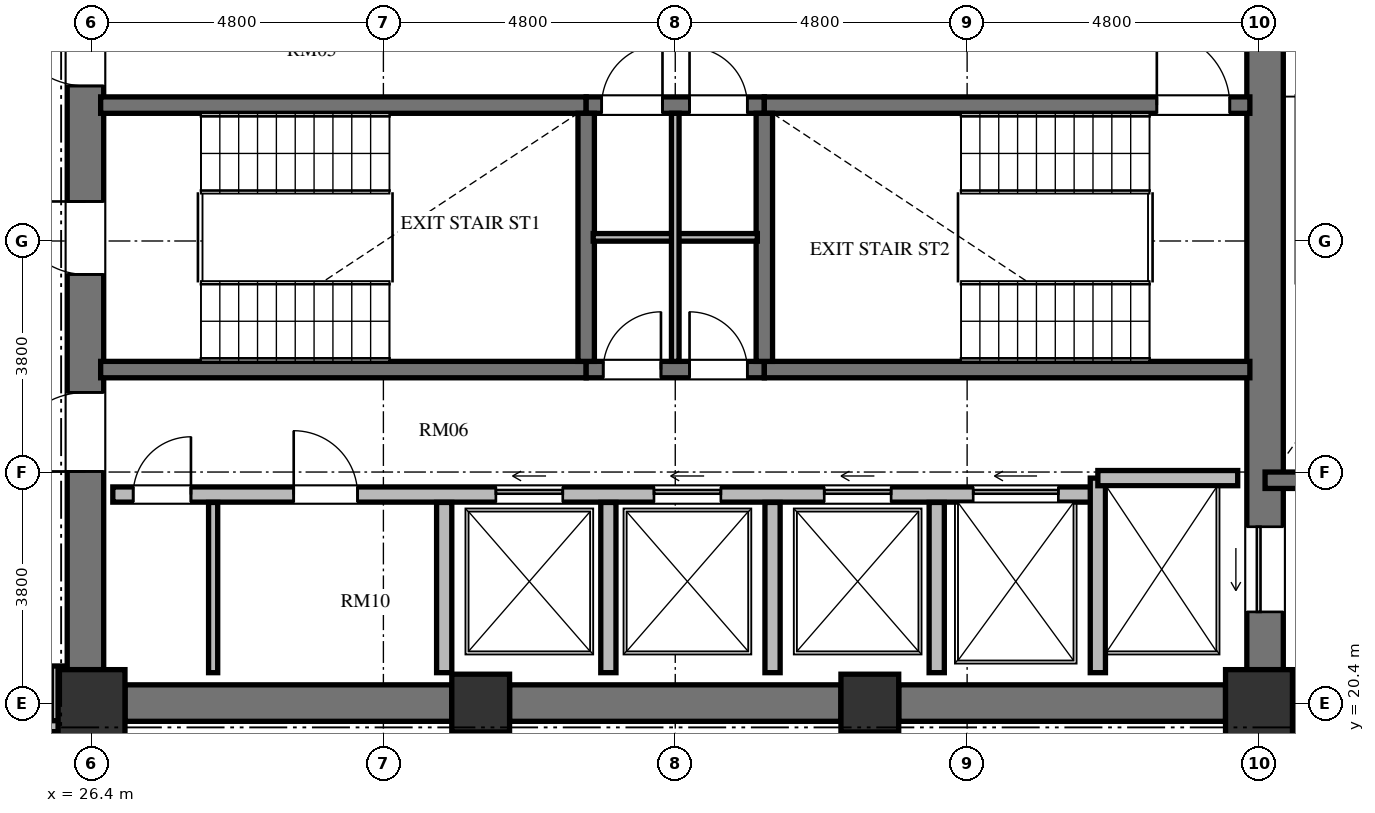
"""IFC4 building model, lengths in metres.
Left out: names, types, materials, properties, quantities, classifications, styles, units other than length and angle.
Written with IfcOpenShell. Run it as: python <this file> out.ifc"""

import sys

from ifc_helpers import new_model, si_unit, direction, frame, frame_2d, origin, origin_2d, place, context, subcontext, project, spatial, rectangle, extrude, element, fill, save


model = new_model("IFC4")
c1 = context("Model", 3, precision=1e-05, world=origin(), true_north=direction((0.0, 1.0)))
c2 = subcontext(c1, "Body", "Model", "MODEL_VIEW")
j1 = project(units=[si_unit("LENGTHUNIT", "METRE"), si_unit("PLANEANGLEUNIT", "RADIAN")], contexts=[c1])
p1 = place(None, origin())
s1 = spatial("IfcSite", under=j1, at=p1, CompositionType="ELEMENT")
p2 = place(p1, origin())
s2 = spatial("IfcBuilding", under=s1, at=p2, CompositionType="ELEMENT")
p3 = place(p2, frame((0.0, 0.0, 141.936)))
s3 = spatial("IfcBuildingStorey", under=s2, at=p3, CompositionType="ELEMENT", Elevation=141.936)
p4 = place(p3, frame((26.4, 20.4, 0.0), z_axis=(0.0, 0.0, 1.0), x_axis=(1.0, 0.0, 0.0)))
e1 = element("IfcColumn", 1, at=p4, inside=s3, PredefinedType="COLUMN", context=c2, shape_type="SweptSolid", body=[
    extrude(rectangle(XDim=1.1, YDim=1.1, at=origin_2d()), origin(), (0.0, 0.0, 1.0), 3.648),
])
for number, where, z_axis, x_axis in (
    (2, (32.8, 20.4, 0.0), (0.0, 0.0, 1.0), (1.0, 0.0, 0.0)),
    (3, (39.2, 20.4, 0.0), (0.0, 0.0, 1.0), (1.0, 0.0, 0.0)),
):
    element("IfcColumn", number, at=place(p3, frame(where, z_axis=z_axis, x_axis=x_axis)), inside=s3, PredefinedType="COLUMN", context=c2, shape_type="SweptSolid", body=[
        extrude(rectangle(XDim=0.95, YDim=0.95, at=origin_2d()), origin(), (0.0, 0.0, 1.0), 3.648),
    ])
p5 = place(p3, frame((45.6, 20.4, 0.0), z_axis=(0.0, 0.0, 1.0), x_axis=(1.0, 0.0, 0.0)))
e4 = element("IfcColumn", 4, at=p5, inside=s3, PredefinedType="COLUMN", context=c2, shape_type="SweptSolid", body=[
    extrude(rectangle(XDim=1.1, YDim=1.1, at=origin_2d()), origin(), (0.0, 0.0, 1.0), 3.648),
])
p6 = place(p3, frame((26.3, 20.95, 0.0), z_axis=(0.0, 0.0, 1.0), x_axis=(0.0, 1.0, 0.0)))
e5 = element("IfcWall", 5, at=p6, inside=s3, PredefinedType="SHEAR", context=c2, shape_type="SweptSolid", body=[
    extrude(rectangle(XDim=14.1, YDim=0.6, at=frame_2d((7.05, 0.0))), origin(), (0.0, 0.0, 1.0), 3.648),
])
p7 = place(p6, frame((6.5, 0.0, 0.0)))
e6 = element("IfcOpeningElement", 6, at=p7, cuts=e5, PredefinedType="OPENING", context=c2, shape_type="SweptSolid", body=[
    extrude(rectangle(XDim=1.2, YDim=2.15, at=frame_2d((0.6, 1.075))), frame((0.0, 0.31, 0.0), z_axis=(0.0, -1.0, 0.0), x_axis=(1.0, 0.0, 0.0)), (0.0, 0.0, 1.0), 0.62),
])
p8 = place(p6, frame((9.6, 0.0, 0.0)))
e7 = element("IfcOpeningElement", 7, at=p8, cuts=e5, PredefinedType="OPENING", context=c2, shape_type="SweptSolid", body=[
    extrude(rectangle(XDim=1.3, YDim=2.2, at=frame_2d((0.65, 1.1))), frame((0.0, 0.31, 0.0), z_axis=(0.0, -1.0, 0.0), x_axis=(1.0, 0.0, 0.0)), (0.0, 0.0, 1.0), 0.62),
])
p9 = place(p6, frame((3.26, 0.0, 0.0)))
e8 = element("IfcOpeningElement", 8, at=p9, cuts=e5, PredefinedType="OPENING", context=c2, shape_type="SweptSolid", body=[
    extrude(rectangle(XDim=1.3, YDim=2.2, at=frame_2d((0.65, 1.1))), frame((0.0, 0.31, 0.0), z_axis=(0.0, -1.0, 0.0), x_axis=(1.0, 0.0, 0.0)), (0.0, 0.0, 1.0), 0.62),
])
p10 = place(p3, frame((45.7, 20.95, 0.0), z_axis=(0.0, 0.0, 1.0), x_axis=(0.0, 1.0, 0.0)))
e9 = element("IfcWall", 9, at=p10, inside=s3, PredefinedType="SHEAR", context=c2, shape_type="SweptSolid", body=[
    extrude(rectangle(XDim=14.1, YDim=0.6, at=frame_2d((7.05, 0.0))), origin(), (0.0, 0.0, 1.0), 3.648),
])
p11 = place(p10, frame((11.75, 0.0, 0.0)))
e10 = element("IfcOpeningElement", 10, at=p11, cuts=e9, PredefinedType="OPENING", context=c2, shape_type="SweptSolid", body=[
    extrude(rectangle(XDim=1.4, YDim=2.3, at=frame_2d((0.7, 1.15))), frame((0.0, 0.31, 0.0), z_axis=(0.0, -1.0, 0.0), x_axis=(1.0, 0.0, 0.0)), (0.0, 0.0, 1.0), 0.62),
])
p12 = place(p10, frame((0.95, 0.0, 0.0)))
e11 = element("IfcOpeningElement", 11, at=p12, cuts=e9, PredefinedType="OPENING", context=c2, shape_type="SweptSolid", body=[
    extrude(rectangle(XDim=1.4, YDim=2.3, at=frame_2d((0.7, 1.15))), frame((0.0, 0.31, 0.0), z_axis=(0.0, -1.0, 0.0), x_axis=(1.0, 0.0, 0.0)), (0.0, 0.0, 1.0), 0.62),
])
p13 = place(p3, frame((26.95, 20.4, 0.0), z_axis=(0.0, 0.0, 1.0), x_axis=(1.0, 0.0, 0.0)))
e12 = element("IfcWall", 12, at=p13, inside=s3, PredefinedType="SHEAR", context=c2, shape_type="SweptSolid", body=[
    extrude(rectangle(XDim=5.375, YDim=0.6, at=frame_2d((2.688, 0.0))), origin(), (0.0, 0.0, 1.0), 3.648),
])
p14 = place(p3, frame((33.275, 20.4, 0.0), z_axis=(0.0, 0.0, 1.0), x_axis=(1.0, 0.0, 0.0)))
e13 = element("IfcWall", 13, at=p14, inside=s3, PredefinedType="SHEAR", context=c2, shape_type="SweptSolid", body=[
    extrude(rectangle(XDim=5.45, YDim=0.6, at=frame_2d((2.725, 0.0))), origin(), (0.0, 0.0, 1.0), 3.648),
])
p15 = place(p3, frame((39.675, 20.4, 0.0), z_axis=(0.0, 0.0, 1.0), x_axis=(1.0, 0.0, 0.0)))
e14 = element("IfcWall", 14, at=p15, inside=s3, PredefinedType="SHEAR", context=c2, shape_type="SweptSolid", body=[
    extrude(rectangle(XDim=5.375, YDim=0.6, at=frame_2d((2.688, 0.0))), origin(), (0.0, 0.0, 1.0), 3.648),
])
p16 = place(p3, frame((26.55, 30.235, 0.0), z_axis=(0.0, 0.0, 1.0), x_axis=(1.0, 0.0, 0.0)))
e15 = element("IfcWall", 15, at=p16, inside=s3, PredefinedType="SHEAR", context=c2, shape_type="SweptSolid", body=[
    extrude(rectangle(XDim=7.985, YDim=0.27, at=frame_2d((3.992, 0.0))), origin(), (0.0, 0.0, 1.0), 3.648),
])
p17 = place(p3, frame((34.535, 30.235, 0.0), z_axis=(0.0, 0.0, 1.0), x_axis=(1.0, 0.0, 0.0)))
e16 = element("IfcWall", 16, at=p17, inside=s3, PredefinedType="SHEAR", context=c2, shape_type="SweptSolid", body=[
    extrude(rectangle(XDim=2.93, YDim=0.27, at=frame_2d((1.465, 0.0))), origin(), (0.0, 0.0, 1.0), 3.648),
])
p18 = place(p17, frame((0.255, 0.0, 0.0)))
e17 = element("IfcOpeningElement", 17, at=p18, cuts=e16, PredefinedType="OPENING", context=c2, shape_type="SweptSolid", body=[
    extrude(rectangle(XDim=1.0, YDim=2.1, at=frame_2d((0.5, 1.05))), frame((0.0, 0.145, 0.0), z_axis=(0.0, -1.0, 0.0), x_axis=(1.0, 0.0, 0.0)), (0.0, 0.0, 1.0), 0.29),
])
p19 = place(p17, frame((1.7, 0.0, 0.0)))
e18 = element("IfcOpeningElement", 18, at=p19, cuts=e16, PredefinedType="OPENING", context=c2, shape_type="SweptSolid", body=[
    extrude(rectangle(XDim=0.95, YDim=2.1, at=frame_2d((0.475, 1.05))), frame((0.0, 0.145, 0.0), z_axis=(0.0, -1.0, 0.0), x_axis=(1.0, 0.0, 0.0)), (0.0, 0.0, 1.0), 0.29),
])
p20 = place(p3, frame((37.465, 30.235, 0.0), z_axis=(0.0, 0.0, 1.0), x_axis=(1.0, 0.0, 0.0)))
e19 = element("IfcWall", 19, at=p20, inside=s3, PredefinedType="SHEAR", context=c2, shape_type="SweptSolid", body=[
    extrude(rectangle(XDim=7.985, YDim=0.27, at=frame_2d((3.992, 0.0))), origin(), (0.0, 0.0, 1.0), 3.648),
])
p21 = place(p20, frame((6.455, 0.0, 0.0)))
e20 = element("IfcOpeningElement", 20, at=p21, cuts=e19, PredefinedType="OPENING", context=c2, shape_type="SweptSolid", body=[
    extrude(rectangle(XDim=1.2, YDim=2.15, at=frame_2d((0.6, 1.075))), frame((0.0, 0.145, 0.0), z_axis=(0.0, -1.0, 0.0), x_axis=(1.0, 0.0, 0.0)), (0.0, 0.0, 1.0), 0.29),
])
p22 = place(p3, frame((26.55, 25.885, 0.0), z_axis=(0.0, 0.0, 1.0), x_axis=(1.0, 0.0, 0.0)))
e21 = element("IfcWall", 21, at=p22, inside=s3, PredefinedType="SHEAR", context=c2, shape_type="SweptSolid", body=[
    extrude(rectangle(XDim=7.985, YDim=0.27, at=frame_2d((3.992, 0.0))), origin(), (0.0, 0.0, 1.0), 3.648),
])
p23 = place(p3, frame((34.535, 25.885, 0.0), z_axis=(0.0, 0.0, 1.0), x_axis=(1.0, 0.0, 0.0)))
e22 = element("IfcWall", 22, at=p23, inside=s3, PredefinedType="SHEAR", context=c2, shape_type="SweptSolid", body=[
    extrude(rectangle(XDim=2.93, YDim=0.27, at=frame_2d((1.465, 0.0))), origin(), (0.0, 0.0, 1.0), 3.648),
])
p24 = place(p23, frame((0.28, 0.0, 0.0)))
e23 = element("IfcOpeningElement", 23, at=p24, cuts=e22, PredefinedType="OPENING", context=c2, shape_type="SweptSolid", body=[
    extrude(rectangle(XDim=0.95, YDim=2.1, at=frame_2d((0.475, 1.05))), frame((0.0, 0.145, 0.0), z_axis=(0.0, -1.0, 0.0), x_axis=(1.0, 0.0, 0.0)), (0.0, 0.0, 1.0), 0.29),
])
p25 = place(p23, frame((1.7, 0.0, 0.0)))
e24 = element("IfcOpeningElement", 24, at=p25, cuts=e22, PredefinedType="OPENING", context=c2, shape_type="SweptSolid", body=[
    extrude(rectangle(XDim=0.95, YDim=2.1, at=frame_2d((0.475, 1.05))), frame((0.0, 0.145, 0.0), z_axis=(0.0, -1.0, 0.0), x_axis=(1.0, 0.0, 0.0)), (0.0, 0.0, 1.0), 0.29),
])
p26 = place(p3, frame((37.465, 25.885, 0.0), z_axis=(0.0, 0.0, 1.0), x_axis=(1.0, 0.0, 0.0)))
e25 = element("IfcWall", 25, at=p26, inside=s3, PredefinedType="SHEAR", context=c2, shape_type="SweptSolid", body=[
    extrude(rectangle(XDim=7.985, YDim=0.27, at=frame_2d((3.992, 0.0))), origin(), (0.0, 0.0, 1.0), 3.648),
])
for number, where, z_axis, x_axis in (
    (26, (34.535, 26.02, 0.0), (0.0, 0.0, 1.0), (0.0, 1.0, 0.0)),
    (27, (37.465, 26.02, 0.0), (0.0, 0.0, 1.0), (0.0, 1.0, 0.0)),
):
    element("IfcWall", number, at=place(p3, frame(where, z_axis=z_axis, x_axis=x_axis)), inside=s3, PredefinedType="SHEAR", context=c2, shape_type="SweptSolid", body=[
        extrude(rectangle(XDim=4.08, YDim=0.27, at=frame_2d((2.04, 0.0))), origin(), (0.0, 0.0, 1.0), 3.648),
    ])
p27 = place(p3, frame((34.65, 28.06, 0.0), z_axis=(0.0, 0.0, 1.0), x_axis=(1.0, 0.0, 0.0)))
e28 = element("IfcWall", 28, at=p27, inside=s3, PredefinedType="PARTITIONING", context=c2, shape_type="SweptSolid", body=[
    extrude(rectangle(XDim=2.7, YDim=0.125, at=frame_2d((1.35, 0.0))), origin(), (0.0, 0.0, 1.0), 3.428),
])
p28 = place(p3, frame((36.0, 26.02, 0.0), z_axis=(0.0, 0.0, 1.0), x_axis=(0.0, 1.0, 0.0)))
e29 = element("IfcWall", 29, at=p28, inside=s3, PredefinedType="PARTITIONING", context=c2, shape_type="SweptSolid", body=[
    extrude(rectangle(XDim=4.08, YDim=0.125, at=frame_2d((2.04, 0.0))), origin(), (0.0, 0.0, 1.0), 3.428),
])
p29 = place(p3, frame((26.75, 23.83, 0.0), z_axis=(0.0, 0.0, 1.0), x_axis=(1.0, 0.0, 0.0)))
e30 = element("IfcWall", 30, at=p29, inside=s3, PredefinedType="SOLIDWALL", context=c2, shape_type="SweptSolid", body=[
    extrude(rectangle(XDim=16.2, YDim=0.25, at=frame_2d((8.1, 0.0))), origin(), (0.0, 0.0, 1.0), 3.428),
])
p30 = place(p29, frame((0.335, 0.0, 0.0)))
e31 = element("IfcOpeningElement", 31, at=p30, cuts=e30, PredefinedType="OPENING", context=c2, shape_type="SweptSolid", body=[
    extrude(rectangle(XDim=0.95, YDim=2.1, at=frame_2d((0.475, 1.05))), frame((0.0, 0.135, 0.0), z_axis=(0.0, -1.0, 0.0), x_axis=(1.0, 0.0, 0.0)), (0.0, 0.0, 1.0), 0.27),
])
p31 = place(p29, frame((2.975, 0.0, 0.0)))
e32 = element("IfcOpeningElement", 32, at=p31, cuts=e30, PredefinedType="OPENING", context=c2, shape_type="SweptSolid", body=[
    extrude(rectangle(XDim=1.05, YDim=2.15, at=frame_2d((0.525, 1.075))), frame((0.0, 0.135, 0.0), z_axis=(0.0, -1.0, 0.0), x_axis=(1.0, 0.0, 0.0)), (0.0, 0.0, 1.0), 0.27),
])
p32 = place(p29, frame((6.3, 0.0, 0.0)))
e33 = element("IfcOpeningElement", 33, at=p32, cuts=e30, PredefinedType="OPENING", context=c2, shape_type="SweptSolid", body=[
    extrude(rectangle(XDim=1.1, YDim=2.2, at=frame_2d((0.55, 1.1))), frame((0.0, 0.135, 0.0), z_axis=(0.0, -1.0, 0.0), x_axis=(1.0, 0.0, 0.0)), (0.0, 0.0, 1.0), 0.27),
])
p33 = place(p29, frame((8.9, 0.0, 0.0)))
e34 = element("IfcOpeningElement", 34, at=p33, cuts=e30, PredefinedType="OPENING", context=c2, shape_type="SweptSolid", body=[
    extrude(rectangle(XDim=1.1, YDim=2.2, at=frame_2d((0.55, 1.1))), frame((0.0, 0.135, 0.0), z_axis=(0.0, -1.0, 0.0), x_axis=(1.0, 0.0, 0.0)), (0.0, 0.0, 1.0), 0.27),
])
p34 = place(p29, frame((11.7, 0.0, 0.0)))
e35 = element("IfcOpeningElement", 35, at=p34, cuts=e30, PredefinedType="OPENING", context=c2, shape_type="SweptSolid", body=[
    extrude(rectangle(XDim=1.1, YDim=2.2, at=frame_2d((0.55, 1.1))), frame((0.0, 0.135, 0.0), z_axis=(0.0, -1.0, 0.0), x_axis=(1.0, 0.0, 0.0)), (0.0, 0.0, 1.0), 0.27),
])
p35 = place(p29, frame((14.15, 0.0, 0.0)))
e36 = element("IfcOpeningElement", 36, at=p35, cuts=e30, PredefinedType="OPENING", context=c2, shape_type="SweptSolid", body=[
    extrude(rectangle(XDim=1.4, YDim=2.3, at=frame_2d((0.7, 1.15))), frame((0.0, 0.135, 0.0), z_axis=(0.0, -1.0, 0.0), x_axis=(1.0, 0.0, 0.0)), (0.0, 0.0, 1.0), 0.27),
])
p36 = place(p3, frame((42.95, 20.9, 0.0), z_axis=(0.0, 0.0, 1.0), x_axis=(0.0, 1.0, 0.0)))
e37 = element("IfcWall", 37, at=p36, inside=s3, PredefinedType="SOLIDWALL", context=c2, shape_type="SweptSolid", body=[
    extrude(rectangle(XDim=3.2, YDim=0.25, at=frame_2d((1.6, 0.0))), origin(), (0.0, 0.0, 1.0), 3.428),
])
p37 = place(p3, frame((42.95, 24.1, 0.0), z_axis=(0.0, 0.0, 1.0), x_axis=(1.0, 0.0, 0.0)))
e38 = element("IfcWall", 38, at=p37, inside=s3, PredefinedType="SOLIDWALL", context=c2, shape_type="SweptSolid", body=[
    extrude(rectangle(XDim=2.3, YDim=0.25, at=frame_2d((1.15, 0.0))), origin(), (0.0, 0.0, 1.0), 3.428),
])
for number, where, z_axis, x_axis in (
    (39, (32.2, 20.9, 0.0), (0.0, 0.0, 1.0), (0.0, 1.0, 0.0)),
    (40, (34.9, 20.9, 0.0), (0.0, 0.0, 1.0), (0.0, 1.0, 0.0)),
    (41, (37.6, 20.9, 0.0), (0.0, 0.0, 1.0), (0.0, 1.0, 0.0)),
    (42, (40.3, 20.9, 0.0), (0.0, 0.0, 1.0), (0.0, 1.0, 0.0)),
):
    element("IfcWall", number, at=place(p3, frame(where, z_axis=z_axis, x_axis=x_axis)), inside=s3, PredefinedType="SOLIDWALL", context=c2, shape_type="SweptSolid", body=[
        extrude(rectangle(XDim=2.8, YDim=0.25, at=frame_2d((1.4, 0.0))), origin(), (0.0, 0.0, 1.0), 3.428),
    ])
p38 = place(p3, frame((28.4, 20.9, 0.0), z_axis=(0.0, 0.0, 1.0), x_axis=(0.0, 1.0, 0.0)))
e43 = element("IfcWall", 43, at=p38, inside=s3, PredefinedType="PARTITIONING", context=c2, shape_type="SweptSolid", body=[
    extrude(rectangle(XDim=2.8, YDim=0.15, at=frame_2d((1.4, 0.0))), origin(), (0.0, 0.0, 1.0), 3.428),
])
p39 = place(p3, frame((45.7, 24.065, 0.0), z_axis=(0.0, 0.0, 1.0), x_axis=(1.0, 0.0, 0.0)))
e44 = element("IfcWall", 44, at=p39, inside=s3, PredefinedType="SHEAR", context=c2, shape_type="SweptSolid", body=[
    extrude(rectangle(XDim=4.715, YDim=0.27, at=frame_2d((2.357, 0.0))), origin(), (0.0, 0.0, 1.0), 3.648),
])
p40 = place(p3, frame((45.7, 20.02, 0.0), z_axis=(0.0, 0.0, 1.0), x_axis=(1.0, 0.0, 0.0)))
e45 = element("IfcWall", 45, at=p40, inside=s3, PredefinedType="SOLIDWALL", context=c2, shape_type="SweptSolid", body=[
    extrude(rectangle(XDim=4.715, YDim=0.25, at=frame_2d((2.357, 0.0))), origin(), (0.0, 0.0, 1.0), 3.428),
])
p41 = place(p3, frame((25.83, 21.01, 0.0), z_axis=(0.0, 0.0, 1.0), x_axis=(0.0, -1.0, 0.0)))
e46 = element("IfcWall", 46, at=p41, inside=s3, PredefinedType="PARTITIONING", context=c2, shape_type="SweptSolid", body=[
    extrude(rectangle(XDim=1.03, YDim=0.18, at=frame_2d((0.515, 0.0))), origin(), (0.0, 0.0, 1.0), 3.428),
])
p42 = place(p3, frame((25.87, 20.02, 0.0), z_axis=(0.0, 0.0, 1.0), x_axis=(-1.0, 0.0, 0.0)))
e47 = element("IfcWall", 47, at=p42, inside=s3, PredefinedType="PARTITIONING", context=c2, shape_type="SweptSolid", body=[
    extrude(rectangle(XDim=2.56, YDim=0.18, at=frame_2d((1.28, 0.0))), origin(), (0.0, 0.0, 1.0), 3.428),
])
p43 = place(p7, origin())
e48 = element("IfcDoor", 48, at=p43, inside=s3, OperationType="SINGLE_SWING_RIGHT", PredefinedType="DOOR", context=c2, shape_type="SweptSolid", body=[
    extrude(rectangle(XDim=1.2, YDim=2.15, at=frame_2d((0.6, 1.075))), frame((0.0, 0.025, 0.0), z_axis=(0.0, -1.0, 0.0), x_axis=(1.0, 0.0, 0.0)), (0.0, 0.0, 1.0), 0.05),
])
fill(e6, e48)
p44 = place(p21, origin())
e49 = element("IfcDoor", 49, at=p44, inside=s3, OperationType="SINGLE_SWING_LEFT", PredefinedType="DOOR", context=c2, shape_type="SweptSolid", body=[
    extrude(rectangle(XDim=1.2, YDim=2.15, at=frame_2d((0.6, 1.075))), frame((0.0, 0.025, 0.0), z_axis=(0.0, -1.0, 0.0), x_axis=(1.0, 0.0, 0.0)), (0.0, 0.0, 1.0), 0.05),
])
fill(e20, e49)
p45 = place(p24, origin())
e50 = element("IfcDoor", 50, at=p45, inside=s3, OperationType="SINGLE_SWING_RIGHT", PredefinedType="DOOR", context=c2, shape_type="SweptSolid", body=[
    extrude(rectangle(XDim=0.95, YDim=2.1, at=frame_2d((0.475, 1.05))), frame((0.0, 0.025, 0.0), z_axis=(0.0, -1.0, 0.0), x_axis=(1.0, 0.0, 0.0)), (0.0, 0.0, 1.0), 0.05),
])
fill(e23, e50)
p46 = place(p25, origin())
e51 = element("IfcDoor", 51, at=p46, inside=s3, OperationType="SINGLE_SWING_LEFT", PredefinedType="DOOR", context=c2, shape_type="SweptSolid", body=[
    extrude(rectangle(XDim=0.95, YDim=2.1, at=frame_2d((0.475, 1.05))), frame((0.0, 0.025, 0.0), z_axis=(0.0, -1.0, 0.0), x_axis=(1.0, 0.0, 0.0)), (0.0, 0.0, 1.0), 0.05),
])
fill(e24, e51)
p47 = place(p18, origin())
e52 = element("IfcDoor", 52, at=p47, inside=s3, OperationType="SINGLE_SWING_RIGHT", PredefinedType="DOOR", context=c2, shape_type="SweptSolid", body=[
    extrude(rectangle(XDim=1.0, YDim=2.1, at=frame_2d((0.5, 1.05))), frame((0.0, 0.025, 0.0), z_axis=(0.0, -1.0, 0.0), x_axis=(1.0, 0.0, 0.0)), (0.0, 0.0, 1.0), 0.05),
])
fill(e17, e52)
p48 = place(p19, origin())
e53 = element("IfcDoor", 53, at=p48, inside=s3, OperationType="SINGLE_SWING_LEFT", PredefinedType="DOOR", context=c2, shape_type="SweptSolid", body=[
    extrude(rectangle(XDim=0.95, YDim=2.1, at=frame_2d((0.475, 1.05))), frame((0.0, 0.025, 0.0), z_axis=(0.0, -1.0, 0.0), x_axis=(1.0, 0.0, 0.0)), (0.0, 0.0, 1.0), 0.05),
])
fill(e18, e53)
p49 = place(p8, origin())
e54 = element("IfcDoor", 54, at=p49, inside=s3, OperationType="SINGLE_SWING_RIGHT", PredefinedType="DOOR", context=c2, shape_type="SweptSolid", body=[
    extrude(rectangle(XDim=1.3, YDim=2.2, at=frame_2d((0.65, 1.1))), frame((0.0, 0.025, 0.0), z_axis=(0.0, -1.0, 0.0), x_axis=(1.0, 0.0, 0.0)), (0.0, 0.0, 1.0), 0.05),
])
fill(e7, e54)
p50 = place(p9, origin())
e55 = element("IfcDoor", 55, at=p50, inside=s3, OperationType="SINGLE_SWING_LEFT", PredefinedType="DOOR", context=c2, shape_type="SweptSolid", body=[
    extrude(rectangle(XDim=1.3, YDim=2.2, at=frame_2d((0.65, 1.1))), frame((0.0, 0.025, 0.0), z_axis=(0.0, -1.0, 0.0), x_axis=(1.0, 0.0, 0.0)), (0.0, 0.0, 1.0), 0.05),
])
fill(e8, e55)
p51 = place(p30, origin())
e56 = element("IfcDoor", 56, at=p51, inside=s3, OperationType="SINGLE_SWING_RIGHT", PredefinedType="DOOR", context=c2, shape_type="SweptSolid", body=[
    extrude(rectangle(XDim=0.95, YDim=2.1, at=frame_2d((0.475, 1.05))), frame((0.0, 0.025, 0.0), z_axis=(0.0, -1.0, 0.0), x_axis=(1.0, 0.0, 0.0)), (0.0, 0.0, 1.0), 0.05),
])
fill(e31, e56)
p52 = place(p31, origin())
e57 = element("IfcDoor", 57, at=p52, inside=s3, OperationType="SINGLE_SWING_LEFT", PredefinedType="DOOR", context=c2, shape_type="SweptSolid", body=[
    extrude(rectangle(XDim=1.05, YDim=2.15, at=frame_2d((0.525, 1.075))), frame((0.0, 0.025, 0.0), z_axis=(0.0, -1.0, 0.0), x_axis=(1.0, 0.0, 0.0)), (0.0, 0.0, 1.0), 0.05),
])
fill(e32, e57)
p53 = place(p32, origin())
e58 = element("IfcDoor", 58, at=p53, inside=s3, OperationType="SLIDING_TO_LEFT", PredefinedType="DOOR", context=c2, shape_type="SweptSolid", body=[
    extrude(rectangle(XDim=1.1, YDim=2.2, at=frame_2d((0.55, 1.1))), frame((0.0, 0.025, 0.0), z_axis=(0.0, -1.0, 0.0), x_axis=(1.0, 0.0, 0.0)), (0.0, 0.0, 1.0), 0.05),
])
fill(e33, e58)
p54 = place(p33, origin())
e59 = element("IfcDoor", 59, at=p54, inside=s3, OperationType="SLIDING_TO_LEFT", PredefinedType="DOOR", context=c2, shape_type="SweptSolid", body=[
    extrude(rectangle(XDim=1.1, YDim=2.2, at=frame_2d((0.55, 1.1))), frame((0.0, 0.025, 0.0), z_axis=(0.0, -1.0, 0.0), x_axis=(1.0, 0.0, 0.0)), (0.0, 0.0, 1.0), 0.05),
])
fill(e34, e59)
p55 = place(p34, origin())
e60 = element("IfcDoor", 60, at=p55, inside=s3, OperationType="SLIDING_TO_LEFT", PredefinedType="DOOR", context=c2, shape_type="SweptSolid", body=[
    extrude(rectangle(XDim=1.1, YDim=2.2, at=frame_2d((0.55, 1.1))), frame((0.0, 0.025, 0.0), z_axis=(0.0, -1.0, 0.0), x_axis=(1.0, 0.0, 0.0)), (0.0, 0.0, 1.0), 0.05),
])
fill(e35, e60)
p56 = place(p12, origin())
e61 = element("IfcDoor", 61, at=p56, inside=s3, OperationType="SLIDING_TO_LEFT", PredefinedType="DOOR", context=c2, shape_type="SweptSolid", body=[
    extrude(rectangle(XDim=1.4, YDim=2.3, at=frame_2d((0.7, 1.15))), frame((0.0, 0.025, 0.0), z_axis=(0.0, -1.0, 0.0), x_axis=(1.0, 0.0, 0.0)), (0.0, 0.0, 1.0), 0.05),
])
fill(e11, e61)
p57 = place(p35, origin())
e62 = element("IfcDoor", 62, at=p57, inside=s3, OperationType="SLIDING_TO_LEFT", PredefinedType="DOOR", context=c2, shape_type="SweptSolid", body=[
    extrude(rectangle(XDim=1.4, YDim=2.3, at=frame_2d((0.7, 1.15))), frame((0.0, 0.025, 0.0), z_axis=(0.0, -1.0, 0.0), x_axis=(1.0, 0.0, 0.0)), (0.0, 0.0, 1.0), 0.05),
])
fill(e36, e62)
save(model, sys.argv[1])
